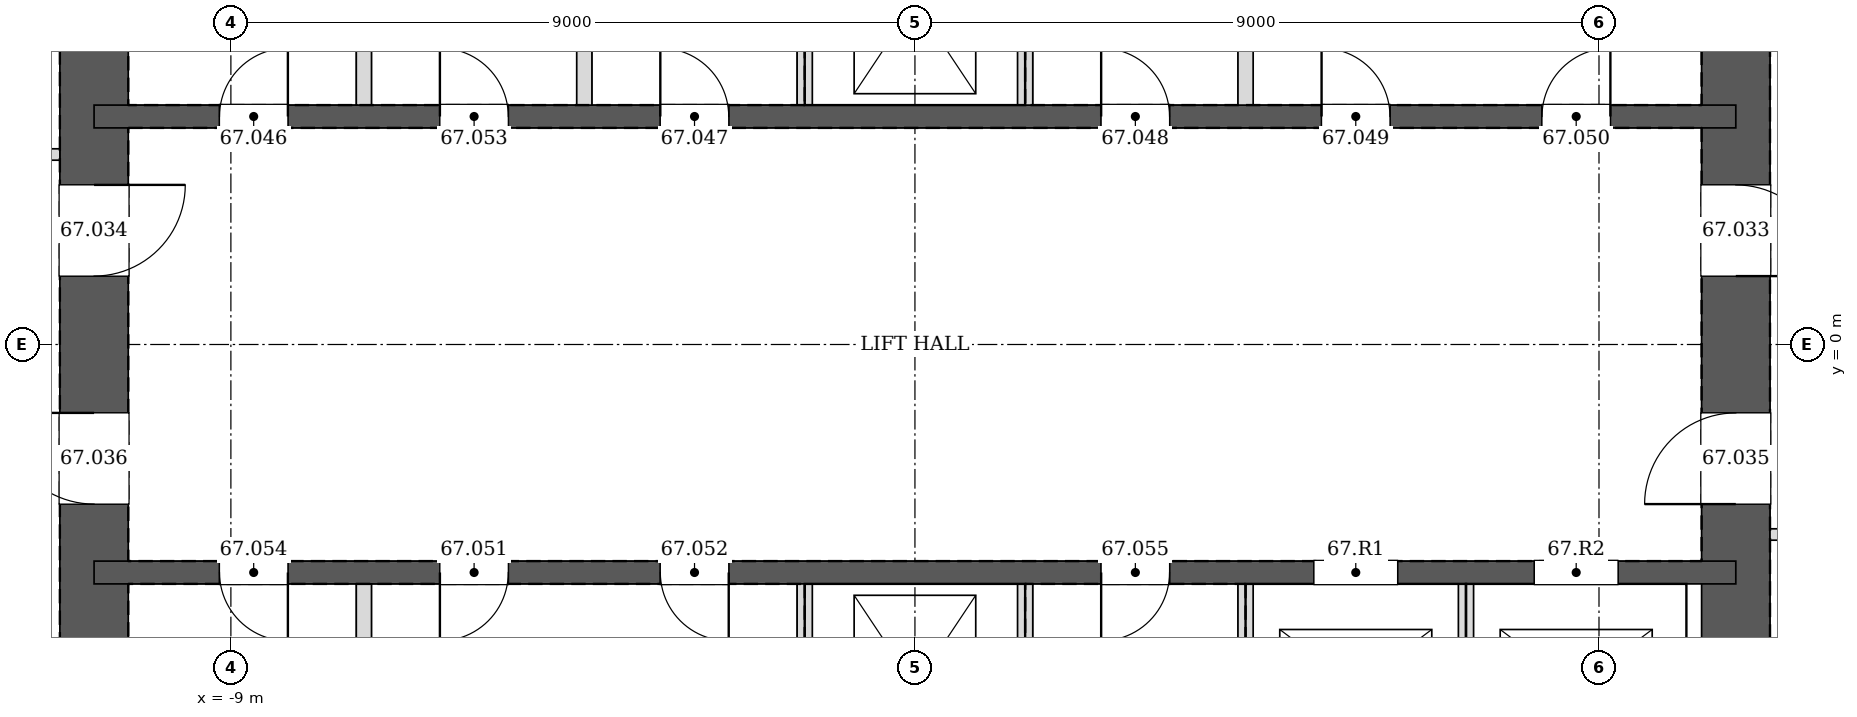
"""IFC4 building model, lengths in metres.
Left out: names, types, materials, properties, quantities, classifications, styles, units other than length and angle.
Written with IfcOpenShell. Run it as: python <this file> out.ifc"""

import sys

from ifc_helpers import new_model, si_unit, direction, frame, frame_2d, origin, place, context, subcontext, project, spatial, rectangle, extrude, element, fill, save


model = new_model("IFC4")
c1 = context("Model", 3, precision=1e-05, world=origin(), true_north=direction((0.0, 1.0)))
c2 = subcontext(c1, "Body", "Model", "MODEL_VIEW")
j1 = project(units=[si_unit("LENGTHUNIT", "METRE"), si_unit("PLANEANGLEUNIT", "RADIAN")], contexts=[c1])
p1 = place(None, origin())
s1 = spatial("IfcSite", under=j1, at=p1, CompositionType="ELEMENT")
p2 = place(p1, origin())
s2 = spatial("IfcBuilding", under=s1, at=p2, CompositionType="ELEMENT")
p3 = place(p2, frame((0.0, 0.0, 277.6)))
s3 = spatial("IfcBuildingStorey", under=s2, at=p3, CompositionType="ELEMENT", Elevation=277.6)
p4 = place(p3, frame((10.8, -10.8, 0.0), z_axis=(0.0, 0.0, 1.0), x_axis=(0.0, 1.0, 0.0)))
e1 = element("IfcWall", 1, at=p4, inside=s3, PredefinedType="SOLIDWALL", context=c2, shape_type="SweptSolid", body=[
    extrude(rectangle(XDim=21.6, YDim=0.9, at=frame_2d((10.8, 0.0))), origin(), (0.0, 0.0, 1.0), 3.4),
])
p5 = place(p4, frame((11.7, 0.0, 0.0)))
e2 = element("IfcOpeningElement", 2, at=p5, cuts=e1, PredefinedType="OPENING", context=c2, shape_type="SweptSolid", body=[
    extrude(rectangle(XDim=1.2, YDim=2.1, at=frame_2d((0.6, 1.05))), frame((0.0, 0.46, 0.0), z_axis=(0.0, -1.0, 0.0), x_axis=(1.0, 0.0, 0.0)), (0.0, 0.0, 1.0), 0.92),
])
p6 = place(p4, frame((8.7, 0.0, 0.0)))
e3 = element("IfcOpeningElement", 3, at=p6, cuts=e1, PredefinedType="OPENING", context=c2, shape_type="SweptSolid", body=[
    extrude(rectangle(XDim=1.2, YDim=2.1, at=frame_2d((0.6, 1.05))), frame((0.0, 0.46, 0.0), z_axis=(0.0, -1.0, 0.0), x_axis=(1.0, 0.0, 0.0)), (0.0, 0.0, 1.0), 0.92),
])
p7 = place(p3, frame((-10.8, 10.8, 0.0), z_axis=(0.0, 0.0, 1.0), x_axis=(0.0, -1.0, 0.0)))
e4 = element("IfcWall", 4, at=p7, inside=s3, PredefinedType="SOLIDWALL", context=c2, shape_type="SweptSolid", body=[
    extrude(rectangle(XDim=21.6, YDim=0.9, at=frame_2d((10.8, 0.0))), origin(), (0.0, 0.0, 1.0), 3.4),
])
p8 = place(p7, frame((8.7, 0.0, 0.0)))
e5 = element("IfcOpeningElement", 5, at=p8, cuts=e4, PredefinedType="OPENING", context=c2, shape_type="SweptSolid", body=[
    extrude(rectangle(XDim=1.2, YDim=2.1, at=frame_2d((0.6, 1.05))), frame((0.0, 0.46, 0.0), z_axis=(0.0, -1.0, 0.0), x_axis=(1.0, 0.0, 0.0)), (0.0, 0.0, 1.0), 0.92),
])
p9 = place(p7, frame((11.7, 0.0, 0.0)))
e6 = element("IfcOpeningElement", 6, at=p9, cuts=e4, PredefinedType="OPENING", context=c2, shape_type="SweptSolid", body=[
    extrude(rectangle(XDim=1.2, YDim=2.1, at=frame_2d((0.6, 1.05))), frame((0.0, 0.46, 0.0), z_axis=(0.0, -1.0, 0.0), x_axis=(1.0, 0.0, 0.0)), (0.0, 0.0, 1.0), 0.92),
])
p10 = place(p3, frame((-10.8, 3.0, 0.0), z_axis=(0.0, 0.0, 1.0), x_axis=(1.0, 0.0, 0.0)))
e7 = element("IfcWall", 7, at=p10, inside=s3, PredefinedType="SOLIDWALL", context=c2, shape_type="SweptSolid", body=[
    extrude(rectangle(XDim=21.6, YDim=0.3, at=frame_2d((10.8, 0.0))), origin(), (0.0, 0.0, 1.0), 3.4),
])
p11 = place(p10, frame((1.65, 0.0, 0.0)))
e8 = element("IfcOpeningElement", 8, at=p11, cuts=e7, PredefinedType="OPENING", context=c2, shape_type="SweptSolid", body=[
    extrude(rectangle(XDim=0.9, YDim=2.1, at=frame_2d((0.45, 1.05))), frame((0.0, 0.16, 0.0), z_axis=(0.0, -1.0, 0.0), x_axis=(1.0, 0.0, 0.0)), (0.0, 0.0, 1.0), 0.32),
])
p12 = place(p10, frame((7.45, 0.0, 0.0)))
e9 = element("IfcOpeningElement", 9, at=p12, cuts=e7, PredefinedType="OPENING", context=c2, shape_type="SweptSolid", body=[
    extrude(rectangle(XDim=0.9, YDim=2.1, at=frame_2d((0.45, 1.05))), frame((0.0, 0.16, 0.0), z_axis=(0.0, -1.0, 0.0), x_axis=(1.0, 0.0, 0.0)), (0.0, 0.0, 1.0), 0.32),
])
p13 = place(p10, frame((13.25, 0.0, 0.0)))
e10 = element("IfcOpeningElement", 10, at=p13, cuts=e7, PredefinedType="OPENING", context=c2, shape_type="SweptSolid", body=[
    extrude(rectangle(XDim=0.9, YDim=2.1, at=frame_2d((0.45, 1.05))), frame((0.0, 0.16, 0.0), z_axis=(0.0, -1.0, 0.0), x_axis=(1.0, 0.0, 0.0)), (0.0, 0.0, 1.0), 0.32),
])
p14 = place(p10, frame((16.15, 0.0, 0.0)))
e11 = element("IfcOpeningElement", 11, at=p14, cuts=e7, PredefinedType="OPENING", context=c2, shape_type="SweptSolid", body=[
    extrude(rectangle(XDim=0.9, YDim=2.1, at=frame_2d((0.45, 1.05))), frame((0.0, 0.16, 0.0), z_axis=(0.0, -1.0, 0.0), x_axis=(1.0, 0.0, 0.0)), (0.0, 0.0, 1.0), 0.32),
])
p15 = place(p10, frame((19.05, 0.0, 0.0)))
e12 = element("IfcOpeningElement", 12, at=p15, cuts=e7, PredefinedType="OPENING", context=c2, shape_type="SweptSolid", body=[
    extrude(rectangle(XDim=0.9, YDim=2.1, at=frame_2d((0.45, 1.05))), frame((0.0, 0.16, 0.0), z_axis=(0.0, -1.0, 0.0), x_axis=(1.0, 0.0, 0.0)), (0.0, 0.0, 1.0), 0.32),
])
p16 = place(p10, frame((4.55, 0.0, 0.0)))
e13 = element("IfcOpeningElement", 13, at=p16, cuts=e7, PredefinedType="OPENING", context=c2, shape_type="SweptSolid", body=[
    extrude(rectangle(XDim=0.9, YDim=2.1, at=frame_2d((0.45, 1.05))), frame((0.0, 0.16, 0.0), z_axis=(0.0, -1.0, 0.0), x_axis=(1.0, 0.0, 0.0)), (0.0, 0.0, 1.0), 0.32),
])
p17 = place(p3, frame((-10.8, -3.0, 0.0), z_axis=(0.0, 0.0, 1.0), x_axis=(1.0, 0.0, 0.0)))
e14 = element("IfcWall", 14, at=p17, inside=s3, PredefinedType="SOLIDWALL", context=c2, shape_type="SweptSolid", body=[
    extrude(rectangle(XDim=21.6, YDim=0.3, at=frame_2d((10.8, 0.0))), origin(), (0.0, 0.0, 1.0), 3.4),
])
p18 = place(p17, frame((4.55, 0.0, 0.0)))
e15 = element("IfcOpeningElement", 15, at=p18, cuts=e14, PredefinedType="OPENING", context=c2, shape_type="SweptSolid", body=[
    extrude(rectangle(XDim=0.9, YDim=2.1, at=frame_2d((0.45, 1.05))), frame((0.0, 0.16, 0.0), z_axis=(0.0, -1.0, 0.0), x_axis=(1.0, 0.0, 0.0)), (0.0, 0.0, 1.0), 0.32),
])
p19 = place(p17, frame((7.45, 0.0, 0.0)))
e16 = element("IfcOpeningElement", 16, at=p19, cuts=e14, PredefinedType="OPENING", context=c2, shape_type="SweptSolid", body=[
    extrude(rectangle(XDim=0.9, YDim=2.1, at=frame_2d((0.45, 1.05))), frame((0.0, 0.16, 0.0), z_axis=(0.0, -1.0, 0.0), x_axis=(1.0, 0.0, 0.0)), (0.0, 0.0, 1.0), 0.32),
])
p20 = place(p17, frame((1.65, 0.0, 0.0)))
e17 = element("IfcOpeningElement", 17, at=p20, cuts=e14, PredefinedType="OPENING", context=c2, shape_type="SweptSolid", body=[
    extrude(rectangle(XDim=0.9, YDim=2.1, at=frame_2d((0.45, 1.05))), frame((0.0, 0.16, 0.0), z_axis=(0.0, -1.0, 0.0), x_axis=(1.0, 0.0, 0.0)), (0.0, 0.0, 1.0), 0.32),
])
p21 = place(p17, frame((13.25, 0.0, 0.0)))
e18 = element("IfcOpeningElement", 18, at=p21, cuts=e14, PredefinedType="OPENING", context=c2, shape_type="SweptSolid", body=[
    extrude(rectangle(XDim=0.9, YDim=2.1, at=frame_2d((0.45, 1.05))), frame((0.0, 0.16, 0.0), z_axis=(0.0, -1.0, 0.0), x_axis=(1.0, 0.0, 0.0)), (0.0, 0.0, 1.0), 0.32),
])
p22 = place(p17, frame((16.05, 0.0, 0.0)))
e19 = element("IfcOpeningElement", 19, at=p22, cuts=e14, PredefinedType="OPENING", context=c2, shape_type="SweptSolid", body=[
    extrude(rectangle(XDim=1.1, YDim=2.1, at=frame_2d((0.55, 1.05))), frame((0.0, 0.16, 0.0), z_axis=(0.0, -1.0, 0.0), x_axis=(1.0, 0.0, 0.0)), (0.0, 0.0, 1.0), 0.32),
])
p23 = place(p17, frame((18.95, 0.0, 0.0)))
e20 = element("IfcOpeningElement", 20, at=p23, cuts=e14, PredefinedType="OPENING", context=c2, shape_type="SweptSolid", body=[
    extrude(rectangle(XDim=1.1, YDim=2.1, at=frame_2d((0.55, 1.05))), frame((0.0, 0.16, 0.0), z_axis=(0.0, -1.0, 0.0), x_axis=(1.0, 0.0, 0.0)), (0.0, 0.0, 1.0), 0.32),
])
p24 = place(p3, frame((11.25, -2.5, 0.0), z_axis=(0.0, 0.0, 1.0), x_axis=(1.0, 0.0, 0.0)))
e21 = element("IfcWall", 21, at=p24, inside=s3, PredefinedType="PARTITIONING", context=c2, shape_type="SweptSolid", body=[
    extrude(rectangle(XDim=1.8, YDim=0.15, at=frame_2d((0.9, 0.0))), origin(), (0.0, 0.0, 1.0), 3.2),
])
p25 = place(p24, frame((0.425, 0.0, 0.0)))
e22 = element("IfcOpeningElement", 22, at=p25, cuts=e21, PredefinedType="OPENING", context=c2, shape_type="SweptSolid", body=[
    extrude(rectangle(XDim=0.95, YDim=2.1, at=frame_2d((0.475, 1.05))), frame((0.0, 0.085, 0.0), z_axis=(0.0, -1.0, 0.0), x_axis=(1.0, 0.0, 0.0)), (0.0, 0.0, 1.0), 0.17),
])
p26 = place(p3, frame((-11.25, 2.5, 0.0), z_axis=(0.0, 0.0, 1.0), x_axis=(-1.0, 0.0, 0.0)))
e23 = element("IfcWall", 23, at=p26, inside=s3, PredefinedType="PARTITIONING", context=c2, shape_type="SweptSolid", body=[
    extrude(rectangle(XDim=1.8, YDim=0.15, at=frame_2d((0.9, 0.0))), origin(), (0.0, 0.0, 1.0), 3.2),
])
p27 = place(p26, frame((0.425, 0.0, 0.0)))
e24 = element("IfcOpeningElement", 24, at=p27, cuts=e23, PredefinedType="OPENING", context=c2, shape_type="SweptSolid", body=[
    extrude(rectangle(XDim=0.95, YDim=2.1, at=frame_2d((0.475, 1.05))), frame((0.0, 0.085, 0.0), z_axis=(0.0, -1.0, 0.0), x_axis=(1.0, 0.0, 0.0)), (0.0, 0.0, 1.0), 0.17),
])
for number, where, z_axis, x_axis in (
    (25, (-7.25, 3.15, 0.0), (0.0, 0.0, 1.0), (0.0, 1.0, 0.0)),
    (26, (-4.35, 3.15, 0.0), (0.0, 0.0, 1.0), (0.0, 1.0, 0.0)),
    (27, (-1.45, 3.15, 0.0), (0.0, 0.0, 1.0), (0.0, 1.0, 0.0)),
    (28, (1.45, 3.15, 0.0), (0.0, 0.0, 1.0), (0.0, 1.0, 0.0)),
    (29, (4.35, 3.15, 0.0), (0.0, 0.0, 1.0), (0.0, 1.0, 0.0)),
    (30, (-7.25, -5.85, 0.0), (0.0, 0.0, 1.0), (0.0, 1.0, 0.0)),
    (31, (-1.45, -5.85, 0.0), (0.0, 0.0, 1.0), (0.0, 1.0, 0.0)),
    (32, (1.45, -5.85, 0.0), (0.0, 0.0, 1.0), (0.0, 1.0, 0.0)),
    (33, (4.35, -5.85, 0.0), (0.0, 0.0, 1.0), (0.0, 1.0, 0.0)),
):
    element("IfcWall", number, at=place(p3, frame(where, z_axis=z_axis, x_axis=x_axis)), inside=s3, PredefinedType="PARTITIONING", context=c2, shape_type="SweptSolid", body=[
        extrude(rectangle(XDim=2.7, YDim=0.2, at=frame_2d((1.35, 0.0))), origin(), (0.0, 0.0, 1.0), 3.2),
    ])
p28 = place(p3, frame((7.25, -5.85, 0.0), z_axis=(0.0, 0.0, 1.0), x_axis=(0.0, 1.0, 0.0)))
e34 = element("IfcWall", 34, at=p28, inside=s3, PredefinedType="PARTITIONING", context=c2, shape_type="SweptSolid", body=[
    extrude(rectangle(XDim=2.7, YDim=0.2, at=frame_2d((1.35, 0.0))), origin(), (0.0, 0.0, 1.0), 3.4),
])
p29 = place(p5, frame((1.2, 0.0, 0.0), z_axis=(0.0, 0.0, 1.0), x_axis=(-1.0, 0.0, 0.0)))
e35 = element("IfcDoor", 35, at=p29, inside=s3, OperationType="SINGLE_SWING_RIGHT", PredefinedType="DOOR", context=c2, shape_type="SweptSolid", body=[
    extrude(rectangle(XDim=1.2, YDim=2.1, at=frame_2d((0.6, 1.05))), frame((0.0, 0.025, 0.0), z_axis=(0.0, -1.0, 0.0), x_axis=(1.0, 0.0, 0.0)), (0.0, 0.0, 1.0), 0.05),
])
fill(e2, e35)
p30 = place(p8, origin())
e36 = element("IfcDoor", 36, at=p30, inside=s3, OperationType="SINGLE_SWING_LEFT", PredefinedType="DOOR", context=c2, shape_type="SweptSolid", body=[
    extrude(rectangle(XDim=1.2, YDim=2.1, at=frame_2d((0.6, 1.05))), frame((0.0, 0.025, 0.0), z_axis=(0.0, -1.0, 0.0), x_axis=(1.0, 0.0, 0.0)), (0.0, 0.0, 1.0), 0.05),
])
fill(e5, e36)
p31 = place(p6, origin())
e37 = element("IfcDoor", 37, at=p31, inside=s3, OperationType="SINGLE_SWING_LEFT", PredefinedType="DOOR", context=c2, shape_type="SweptSolid", body=[
    extrude(rectangle(XDim=1.2, YDim=2.1, at=frame_2d((0.6, 1.05))), frame((0.0, 0.025, 0.0), z_axis=(0.0, -1.0, 0.0), x_axis=(1.0, 0.0, 0.0)), (0.0, 0.0, 1.0), 0.05),
])
fill(e3, e37)
p32 = place(p9, frame((1.2, 0.0, 0.0), z_axis=(0.0, 0.0, 1.0), x_axis=(-1.0, 0.0, 0.0)))
e38 = element("IfcDoor", 38, at=p32, inside=s3, OperationType="SINGLE_SWING_RIGHT", PredefinedType="DOOR", context=c2, shape_type="SweptSolid", body=[
    extrude(rectangle(XDim=1.2, YDim=2.1, at=frame_2d((0.6, 1.05))), frame((0.0, 0.025, 0.0), z_axis=(0.0, -1.0, 0.0), x_axis=(1.0, 0.0, 0.0)), (0.0, 0.0, 1.0), 0.05),
])
fill(e6, e38)
p33 = place(p11, origin())
e39 = element("IfcDoor", 39, at=p33, inside=s3, OperationType="SINGLE_SWING_RIGHT", PredefinedType="DOOR", context=c2, shape_type="SweptSolid", body=[
    extrude(rectangle(XDim=0.9, YDim=2.1, at=frame_2d((0.45, 1.05))), frame((0.0, 0.025, 0.0), z_axis=(0.0, -1.0, 0.0), x_axis=(1.0, 0.0, 0.0)), (0.0, 0.0, 1.0), 0.05),
])
fill(e8, e39)
p34 = place(p12, origin())
e40 = element("IfcDoor", 40, at=p34, inside=s3, OperationType="SINGLE_SWING_LEFT", PredefinedType="DOOR", context=c2, shape_type="SweptSolid", body=[
    extrude(rectangle(XDim=0.9, YDim=2.1, at=frame_2d((0.45, 1.05))), frame((0.0, 0.025, 0.0), z_axis=(0.0, -1.0, 0.0), x_axis=(1.0, 0.0, 0.0)), (0.0, 0.0, 1.0), 0.05),
])
fill(e9, e40)
p35 = place(p13, origin())
e41 = element("IfcDoor", 41, at=p35, inside=s3, OperationType="SINGLE_SWING_LEFT", PredefinedType="DOOR", context=c2, shape_type="SweptSolid", body=[
    extrude(rectangle(XDim=0.9, YDim=2.1, at=frame_2d((0.45, 1.05))), frame((0.0, 0.025, 0.0), z_axis=(0.0, -1.0, 0.0), x_axis=(1.0, 0.0, 0.0)), (0.0, 0.0, 1.0), 0.05),
])
fill(e10, e41)
p36 = place(p14, origin())
e42 = element("IfcDoor", 42, at=p36, inside=s3, OperationType="SINGLE_SWING_LEFT", PredefinedType="DOOR", context=c2, shape_type="SweptSolid", body=[
    extrude(rectangle(XDim=0.9, YDim=2.1, at=frame_2d((0.45, 1.05))), frame((0.0, 0.025, 0.0), z_axis=(0.0, -1.0, 0.0), x_axis=(1.0, 0.0, 0.0)), (0.0, 0.0, 1.0), 0.05),
])
fill(e11, e42)
p37 = place(p15, origin())
e43 = element("IfcDoor", 43, at=p37, inside=s3, OperationType="SINGLE_SWING_RIGHT", PredefinedType="DOOR", context=c2, shape_type="SweptSolid", body=[
    extrude(rectangle(XDim=0.9, YDim=2.1, at=frame_2d((0.45, 1.05))), frame((0.0, 0.025, 0.0), z_axis=(0.0, -1.0, 0.0), x_axis=(1.0, 0.0, 0.0)), (0.0, 0.0, 1.0), 0.05),
])
fill(e12, e43)
p38 = place(p18, frame((0.9, 0.0, 0.0), z_axis=(0.0, 0.0, 1.0), x_axis=(-1.0, 0.0, 0.0)))
e44 = element("IfcDoor", 44, at=p38, inside=s3, OperationType="SINGLE_SWING_RIGHT", PredefinedType="DOOR", context=c2, shape_type="SweptSolid", body=[
    extrude(rectangle(XDim=0.9, YDim=2.1, at=frame_2d((0.45, 1.05))), frame((0.0, 0.025, 0.0), z_axis=(0.0, -1.0, 0.0), x_axis=(1.0, 0.0, 0.0)), (0.0, 0.0, 1.0), 0.05),
])
fill(e15, e44)
p39 = place(p19, frame((0.9, 0.0, 0.0), z_axis=(0.0, 0.0, 1.0), x_axis=(-1.0, 0.0, 0.0)))
e45 = element("IfcDoor", 45, at=p39, inside=s3, OperationType="SINGLE_SWING_LEFT", PredefinedType="DOOR", context=c2, shape_type="SweptSolid", body=[
    extrude(rectangle(XDim=0.9, YDim=2.1, at=frame_2d((0.45, 1.05))), frame((0.0, 0.025, 0.0), z_axis=(0.0, -1.0, 0.0), x_axis=(1.0, 0.0, 0.0)), (0.0, 0.0, 1.0), 0.05),
])
fill(e16, e45)
p40 = place(p16, origin())
e46 = element("IfcDoor", 46, at=p40, inside=s3, OperationType="SINGLE_SWING_LEFT", PredefinedType="DOOR", context=c2, shape_type="SweptSolid", body=[
    extrude(rectangle(XDim=0.9, YDim=2.1, at=frame_2d((0.45, 1.05))), frame((0.0, 0.025, 0.0), z_axis=(0.0, -1.0, 0.0), x_axis=(1.0, 0.0, 0.0)), (0.0, 0.0, 1.0), 0.05),
])
fill(e13, e46)
p41 = place(p20, frame((0.9, 0.0, 0.0), z_axis=(0.0, 0.0, 1.0), x_axis=(-1.0, 0.0, 0.0)))
e47 = element("IfcDoor", 47, at=p41, inside=s3, OperationType="SINGLE_SWING_LEFT", PredefinedType="DOOR", context=c2, shape_type="SweptSolid", body=[
    extrude(rectangle(XDim=0.9, YDim=2.1, at=frame_2d((0.45, 1.05))), frame((0.0, 0.025, 0.0), z_axis=(0.0, -1.0, 0.0), x_axis=(1.0, 0.0, 0.0)), (0.0, 0.0, 1.0), 0.05),
])
fill(e17, e47)
p42 = place(p21, frame((0.9, 0.0, 0.0), z_axis=(0.0, 0.0, 1.0), x_axis=(-1.0, 0.0, 0.0)))
e48 = element("IfcDoor", 48, at=p42, inside=s3, OperationType="SINGLE_SWING_RIGHT", PredefinedType="DOOR", context=c2, shape_type="SweptSolid", body=[
    extrude(rectangle(XDim=0.9, YDim=2.1, at=frame_2d((0.45, 1.05))), frame((0.0, 0.025, 0.0), z_axis=(0.0, -1.0, 0.0), x_axis=(1.0, 0.0, 0.0)), (0.0, 0.0, 1.0), 0.05),
])
fill(e18, e48)
p43 = place(p22, origin())
e49 = element("IfcDoor", 49, at=p43, inside=s3, OperationType="DOUBLE_DOOR_SLIDING", PredefinedType="DOOR", context=c2, shape_type="SweptSolid", body=[
    extrude(rectangle(XDim=1.1, YDim=2.1, at=frame_2d((0.55, 1.05))), frame((0.0, 0.025, 0.0), z_axis=(0.0, -1.0, 0.0), x_axis=(1.0, 0.0, 0.0)), (0.0, 0.0, 1.0), 0.05),
])
fill(e19, e49)
p44 = place(p23, origin())
e50 = element("IfcDoor", 50, at=p44, inside=s3, OperationType="DOUBLE_DOOR_SLIDING", PredefinedType="DOOR", context=c2, shape_type="SweptSolid", body=[
    extrude(rectangle(XDim=1.1, YDim=2.1, at=frame_2d((0.55, 1.05))), frame((0.0, 0.025, 0.0), z_axis=(0.0, -1.0, 0.0), x_axis=(1.0, 0.0, 0.0)), (0.0, 0.0, 1.0), 0.05),
])
fill(e20, e50)
save(model, sys.argv[1])
